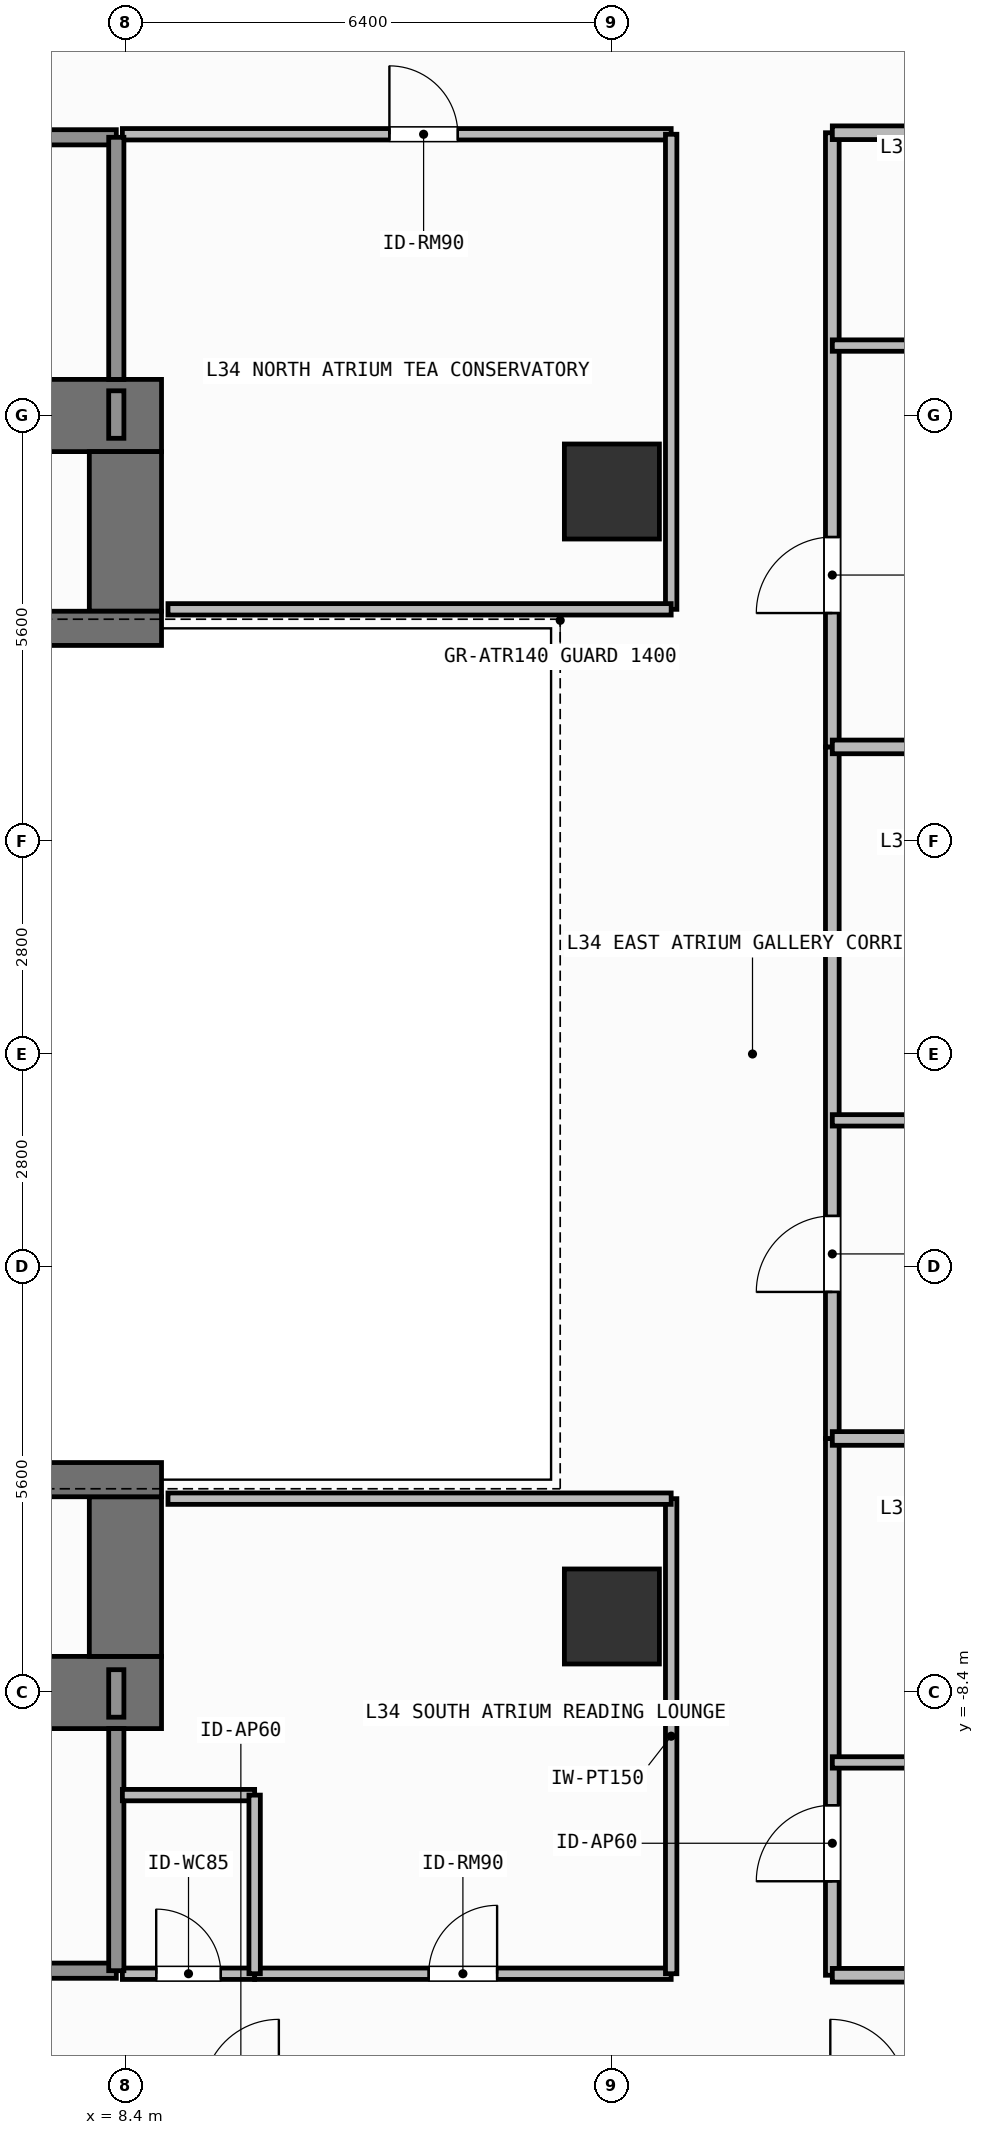
"""IFC4 building model, lengths in metres.
Left out: names, types, materials, properties, quantities, classifications, styles, units other than length and angle.
Written with IfcOpenShell. Run it as: python <this file> out.ifc"""

import sys

from ifc_helpers import new_model, si_unit, direction, frame, frame_2d, origin, origin_2d, place, context, subcontext, project, spatial, rectangle, extrude, element, fill, save


model = new_model("IFC4")
c1 = context("Model", 3, precision=1e-05, world=origin(), true_north=direction((0.0, 1.0)))
c2 = subcontext(c1, "Body", "Model", "MODEL_VIEW")
j1 = project(units=[si_unit("LENGTHUNIT", "METRE"), si_unit("PLANEANGLEUNIT", "RADIAN")], contexts=[c1])
p1 = place(None, origin())
s1 = spatial("IfcSite", under=j1, at=p1, CompositionType="ELEMENT")
p2 = place(p1, origin())
s2 = spatial("IfcBuilding", under=s1, at=p2, CompositionType="ELEMENT")
p3 = place(p2, frame((0.0, 0.0, 136.8)))
s3 = spatial("IfcBuildingStorey", under=s2, at=p3, CompositionType="ELEMENT", Elevation=136.8)
p4 = place(p3, frame((6.12, -8.4, 0.0), z_axis=(0.0, 0.0, 1.0), x_axis=(1.0, 0.0, 0.0)))
e1 = element("IfcWall", 1, at=p4, inside=s3, PredefinedType="SHEAR", context=c2, shape_type="SweptSolid", body=[
    extrude(rectangle(XDim=2.755, YDim=0.95, at=frame_2d((1.377, 0.0))), origin(), (0.0, 0.0, 1.0), 3.9),
])
p5 = place(p3, frame((-7.55, 8.4, 0.0), z_axis=(0.0, 0.0, 1.0), x_axis=(1.0, 0.0, 0.0)))
e2 = element("IfcWall", 2, at=p5, inside=s3, PredefinedType="SHEAR", context=c2, shape_type="SweptSolid", body=[
    extrude(rectangle(XDim=16.425, YDim=0.95, at=frame_2d((8.212, 0.0))), origin(), (0.0, 0.0, 1.0), 3.9),
])
for number, where, z_axis, x_axis in (
    (3, (8.4, -7.925, 0.0), (0.0, 0.0, 1.0), (0.0, 1.0, 0.0)),
    (4, (8.4, 5.825, 0.0), (0.0, 0.0, 1.0), (0.0, 1.0, 0.0)),
):
    element("IfcWall", number, at=place(p3, frame(where, z_axis=z_axis, x_axis=x_axis)), inside=s3, PredefinedType="SHEAR", context=c2, shape_type="SweptSolid", body=[
        extrude(rectangle(XDim=2.1, YDim=0.95, at=frame_2d((1.05, 0.0))), origin(), (0.0, 0.0, 1.0), 3.9),
    ])
for number, where, z_axis, x_axis in (
    (5, (3.045, -5.6, 0.0), (0.0, 0.0, 1.0), (1.0, 0.0, 0.0)),
    (6, (3.045, 5.6, 0.0), (0.0, 0.0, 1.0), (1.0, 0.0, 0.0)),
):
    element("IfcWall", number, at=place(p3, frame(where, z_axis=z_axis, x_axis=x_axis)), inside=s3, PredefinedType="SHEAR", context=c2, shape_type="SweptSolid", body=[
        extrude(rectangle(XDim=5.83, YDim=0.45, at=frame_2d((2.915, 0.0))), origin(), (0.0, 0.0, 1.0), 3.9),
    ])
for number, where, z_axis, x_axis in (
    (7, (14.8, -7.4, 0.0), (0.0, 0.0, 1.0), (1.0, 0.0, 0.0)),
    (8, (14.8, 7.4, 0.0), (0.0, 0.0, 1.0), (1.0, 0.0, 0.0)),
):
    element("IfcColumn", number, at=place(p3, frame(where, z_axis=z_axis, x_axis=x_axis)), inside=s3, PredefinedType="COLUMN", context=c2, shape_type="SweptSolid", body=[
        extrude(rectangle(XDim=1.25, YDim=1.25, at=origin_2d()), origin(), (0.0, 0.0, 1.0), 3.9),
    ])
p6 = place(p3, frame((4.58, -12.06, 0.0), z_axis=(0.0, 0.0, 1.0), x_axis=(1.0, 0.0, 0.0)))
e9 = element("IfcWall", 9, at=p6, inside=s3, PredefinedType="SOLIDWALL", context=c2, shape_type="SweptSolid", body=[
    extrude(rectangle(XDim=3.7, YDim=0.2, at=frame_2d((1.85, 0.0))), origin(), (0.0, 0.0, 1.0), 3.68),
])
p7 = place(p6, frame((1.212, 0.0, 0.0)))
e10 = element("IfcOpeningElement", 10, at=p7, cuts=e9, PredefinedType="OPENING", context=c2, shape_type="SweptSolid", body=[
    extrude(rectangle(XDim=1.1, YDim=2.15, at=frame_2d((0.55, 1.075))), frame((0.0, 0.11, 0.0), z_axis=(0.0, -1.0, 0.0), x_axis=(1.0, 0.0, 0.0)), (0.0, 0.0, 1.0), 0.22),
])
p8 = place(p3, frame((4.58, 12.06, 0.0), z_axis=(0.0, 0.0, 1.0), x_axis=(1.0, 0.0, 0.0)))
e11 = element("IfcWall", 11, at=p8, inside=s3, PredefinedType="SOLIDWALL", context=c2, shape_type="SweptSolid", body=[
    extrude(rectangle(XDim=3.7, YDim=0.2, at=frame_2d((1.85, 0.0))), origin(), (0.0, 0.0, 1.0), 3.68),
])
p9 = place(p8, frame((1.212, 0.0, 0.0)))
e12 = element("IfcOpeningElement", 12, at=p9, cuts=e11, PredefinedType="OPENING", context=c2, shape_type="SweptSolid", body=[
    extrude(rectangle(XDim=1.1, YDim=2.15, at=frame_2d((0.55, 1.075))), frame((0.0, 0.11, 0.0), z_axis=(0.0, -1.0, 0.0), x_axis=(1.0, 0.0, 0.0)), (0.0, 0.0, 1.0), 0.22),
])
p10 = place(p3, frame((8.36, -12.1, 0.0), z_axis=(0.0, 0.0, 1.0), x_axis=(1.0, 0.0, 0.0)))
e13 = element("IfcWall", 13, at=p10, inside=s3, PredefinedType="PARTITIONING", context=c2, shape_type="SweptSolid", body=[
    extrude(rectangle(XDim=1.74, YDim=0.15, at=frame_2d((0.87, 0.0))), origin(), (0.0, 0.0, 1.0), 3.68),
])
p11 = place(p10, frame((0.445, 0.0, 0.0)))
e14 = element("IfcOpeningElement", 14, at=p11, cuts=e13, PredefinedType="OPENING", context=c2, shape_type="SweptSolid", body=[
    extrude(rectangle(XDim=0.85, YDim=2.1, at=frame_2d((0.425, 1.05))), frame((0.0, 0.085, 0.0), z_axis=(0.0, -1.0, 0.0), x_axis=(1.0, 0.0, 0.0)), (0.0, 0.0, 1.0), 0.17),
])
p12 = place(p3, frame((10.1, -12.1, 0.0), z_axis=(0.0, 0.0, 1.0), x_axis=(1.0, 0.0, 0.0)))
e15 = element("IfcWall", 15, at=p12, inside=s3, PredefinedType="PARTITIONING", context=c2, shape_type="SweptSolid", body=[
    extrude(rectangle(XDim=5.48, YDim=0.15, at=frame_2d((2.74, 0.0))), origin(), (0.0, 0.0, 1.0), 3.68),
])
p13 = place(p12, frame((2.29, 0.0, 0.0)))
e16 = element("IfcOpeningElement", 16, at=p13, cuts=e15, PredefinedType="OPENING", context=c2, shape_type="SweptSolid", body=[
    extrude(rectangle(XDim=0.9, YDim=2.1, at=frame_2d((0.45, 1.05))), frame((0.0, 0.085, 0.0), z_axis=(0.0, -1.0, 0.0), x_axis=(1.0, 0.0, 0.0)), (0.0, 0.0, 1.0), 0.17),
])
p14 = place(p3, frame((8.36, 12.1, 0.0), z_axis=(0.0, 0.0, 1.0), x_axis=(1.0, 0.0, 0.0)))
e17 = element("IfcWall", 17, at=p14, inside=s3, PredefinedType="PARTITIONING", context=c2, shape_type="SweptSolid", body=[
    extrude(rectangle(XDim=7.22, YDim=0.15, at=frame_2d((3.61, 0.0))), origin(), (0.0, 0.0, 1.0), 3.68),
])
p15 = place(p14, frame((3.513, 0.0, 0.0)))
e18 = element("IfcOpeningElement", 18, at=p15, cuts=e17, PredefinedType="OPENING", context=c2, shape_type="SweptSolid", body=[
    extrude(rectangle(XDim=0.9, YDim=2.1, at=frame_2d((0.45, 1.05))), frame((0.0, 0.085, 0.0), z_axis=(0.0, -1.0, 0.0), x_axis=(1.0, 0.0, 0.0)), (0.0, 0.0, 1.0), 0.17),
])
p16 = place(p3, frame((17.7, -12.12, 0.0), z_axis=(0.0, 0.0, 1.0), x_axis=(0.0, 1.0, 0.0)))
e19 = element("IfcWall", 19, at=p16, inside=s3, PredefinedType="PARTITIONING", context=c2, shape_type="SweptSolid", body=[
    extrude(rectangle(XDim=7.062, YDim=0.18, at=frame_2d((3.531, 0.0))), origin(), (0.0, 0.0, 1.0), 3.68),
])
p17 = place(p16, frame((1.237, 0.0, 0.0)))
e20 = element("IfcOpeningElement", 20, at=p17, cuts=e19, PredefinedType="OPENING", context=c2, shape_type="SweptSolid", body=[
    extrude(rectangle(XDim=1.0, YDim=2.2, at=frame_2d((0.5, 1.1))), frame((0.0, 0.1, 0.0), z_axis=(0.0, -1.0, 0.0), x_axis=(1.0, 0.0, 0.0)), (0.0, 0.0, 1.0), 0.2),
])
p18 = place(p3, frame((17.7, -9.32, 0.0), z_axis=(0.0, 0.0, 1.0), x_axis=(1.0, 0.0, 0.0)))
e21 = element("IfcWall", 21, at=p18, inside=s3, PredefinedType="PARTITIONING", context=c2, shape_type="SweptSolid", body=[
    extrude(rectangle(XDim=3.552, YDim=0.15, at=frame_2d((1.776, 0.0))), origin(), (0.0, 0.0, 1.0), 3.68),
])
p19 = place(p18, frame((2.372, 0.0, 0.0)))
e22 = element("IfcOpeningElement", 22, at=p19, cuts=e21, PredefinedType="OPENING", context=c2, shape_type="SweptSolid", body=[
    extrude(rectangle(XDim=0.85, YDim=2.1, at=frame_2d((0.425, 1.05))), frame((0.0, 0.085, 0.0), z_axis=(0.0, -1.0, 0.0), x_axis=(1.0, 0.0, 0.0)), (0.0, 0.0, 1.0), 0.17),
])
p20 = place(p3, frame((17.7, -5.058, 0.0), z_axis=(0.0, 0.0, 1.0), x_axis=(0.0, 1.0, 0.0)))
e23 = element("IfcWall", 23, at=p20, inside=s3, PredefinedType="PARTITIONING", context=c2, shape_type="SweptSolid", body=[
    extrude(rectangle(XDim=9.098, YDim=0.18, at=frame_2d((4.549, 0.0))), origin(), (0.0, 0.0, 1.0), 3.68),
])
p21 = place(p20, frame((1.928, 0.0, 0.0)))
e24 = element("IfcOpeningElement", 24, at=p21, cuts=e23, PredefinedType="OPENING", context=c2, shape_type="SweptSolid", body=[
    extrude(rectangle(XDim=1.0, YDim=2.2, at=frame_2d((0.5, 1.1))), frame((0.0, 0.1, 0.0), z_axis=(0.0, -1.0, 0.0), x_axis=(1.0, 0.0, 0.0)), (0.0, 0.0, 1.0), 0.2),
])
p22 = place(p3, frame((17.7, -0.873, 0.0), z_axis=(0.0, 0.0, 1.0), x_axis=(1.0, 0.0, 0.0)))
e25 = element("IfcWall", 25, at=p22, inside=s3, PredefinedType="PARTITIONING", context=c2, shape_type="SweptSolid", body=[
    extrude(rectangle(XDim=3.552, YDim=0.15, at=frame_2d((1.776, 0.0))), origin(), (0.0, 0.0, 1.0), 3.68),
])
p23 = place(p22, frame((1.351, 0.0, 0.0)))
e26 = element("IfcOpeningElement", 26, at=p23, cuts=e25, PredefinedType="OPENING", context=c2, shape_type="SweptSolid", body=[
    extrude(rectangle(XDim=0.85, YDim=2.1, at=frame_2d((0.425, 1.05))), frame((0.0, 0.085, 0.0), z_axis=(0.0, -1.0, 0.0), x_axis=(1.0, 0.0, 0.0)), (0.0, 0.0, 1.0), 0.17),
])
p24 = place(p3, frame((17.7, 4.04, 0.0), z_axis=(0.0, 0.0, 1.0), x_axis=(0.0, 1.0, 0.0)))
e27 = element("IfcWall", 27, at=p24, inside=s3, PredefinedType="PARTITIONING", context=c2, shape_type="SweptSolid", body=[
    extrude(rectangle(XDim=8.08, YDim=0.18, at=frame_2d((4.04, 0.0))), origin(), (0.0, 0.0, 1.0), 3.68),
])
p25 = place(p24, frame((1.761, 0.0, 0.0)))
e28 = element("IfcOpeningElement", 28, at=p25, cuts=e27, PredefinedType="OPENING", context=c2, shape_type="SweptSolid", body=[
    extrude(rectangle(XDim=1.0, YDim=2.2, at=frame_2d((0.5, 1.1))), frame((0.0, 0.1, 0.0), z_axis=(0.0, -1.0, 0.0), x_axis=(1.0, 0.0, 0.0)), (0.0, 0.0, 1.0), 0.2),
])
p26 = place(p3, frame((17.7, 9.32, 0.0), z_axis=(0.0, 0.0, 1.0), x_axis=(1.0, 0.0, 0.0)))
e29 = element("IfcWall", 29, at=p26, inside=s3, PredefinedType="PARTITIONING", context=c2, shape_type="SweptSolid", body=[
    extrude(rectangle(XDim=3.552, YDim=0.15, at=frame_2d((1.776, 0.0))), origin(), (0.0, 0.0, 1.0), 3.68),
])
p27 = place(p26, frame((2.372, 0.0, 0.0)))
e30 = element("IfcOpeningElement", 30, at=p27, cuts=e29, PredefinedType="OPENING", context=c2, shape_type="SweptSolid", body=[
    extrude(rectangle(XDim=0.85, YDim=2.1, at=frame_2d((0.425, 1.05))), frame((0.0, 0.085, 0.0), z_axis=(0.0, -1.0, 0.0), x_axis=(1.0, 0.0, 0.0)), (0.0, 0.0, 1.0), 0.17),
])
for number, where, z_axis, x_axis in (
    (31, (8.28, -12.06, 0.0), (0.0, 0.0, 1.0), (0.0, 1.0, 0.0)),
    (32, (8.28, 8.875, 0.0), (0.0, 0.0, 1.0), (0.0, 1.0, 0.0)),
):
    element("IfcWall", number, at=place(p3, frame(where, z_axis=z_axis, x_axis=x_axis)), inside=s3, PredefinedType="SOLIDWALL", context=c2, shape_type="SweptSolid", body=[
        extrude(rectangle(XDim=3.185, YDim=0.2, at=frame_2d((1.593, 0.0))), origin(), (0.0, 0.0, 1.0), 3.68),
    ])
p28 = place(p3, frame((8.28, -8.725, 0.0), z_axis=(0.0, 0.0, 1.0), x_axis=(0.0, 1.0, 0.0)))
e33 = element("IfcWall", 33, at=p28, inside=s3, PredefinedType="SOLIDWALL", context=c2, shape_type="SweptSolid", body=[
    extrude(rectangle(XDim=0.625, YDim=0.2, at=frame_2d((0.312, 0.0))), origin(), (0.0, 0.0, 1.0), 3.68),
])
p29 = place(p3, frame((8.36, -9.75, 0.0), z_axis=(0.0, 0.0, 1.0), x_axis=(1.0, 0.0, 0.0)))
e34 = element("IfcWall", 34, at=p29, inside=s3, PredefinedType="PARTITIONING", context=c2, shape_type="SweptSolid", body=[
    extrude(rectangle(XDim=1.74, YDim=0.15, at=frame_2d((0.87, 0.0))), origin(), (0.0, 0.0, 1.0), 3.68),
])
p30 = place(p3, frame((10.1, -12.1, 0.0), z_axis=(0.0, 0.0, 1.0), x_axis=(0.0, 1.0, 0.0)))
e35 = element("IfcWall", 35, at=p30, inside=s3, PredefinedType="PARTITIONING", context=c2, shape_type="SweptSolid", body=[
    extrude(rectangle(XDim=2.35, YDim=0.15, at=frame_2d((1.175, 0.0))), origin(), (0.0, 0.0, 1.0), 3.68),
])
p31 = place(p3, frame((15.58, -12.1, 0.0), z_axis=(0.0, 0.0, 1.0), x_axis=(0.0, 1.0, 0.0)))
e36 = element("IfcWall", 36, at=p31, inside=s3, PredefinedType="PARTITIONING", context=c2, shape_type="SweptSolid", body=[
    extrude(rectangle(XDim=6.25, YDim=0.15, at=frame_2d((3.125, 0.0))), origin(), (0.0, 0.0, 1.0), 3.68),
])
p32 = place(p3, frame((8.96, -5.85, 0.0), z_axis=(0.0, 0.0, 1.0), x_axis=(1.0, 0.0, 0.0)))
e37 = element("IfcWall", 37, at=p32, inside=s3, PredefinedType="PARTITIONING", context=c2, shape_type="SweptSolid", body=[
    extrude(rectangle(XDim=6.62, YDim=0.15, at=frame_2d((3.31, 0.0))), origin(), (0.0, 0.0, 1.0), 3.68),
])
p33 = place(p3, frame((8.28, 8.1, 0.0), z_axis=(0.0, 0.0, 1.0), x_axis=(0.0, 1.0, 0.0)))
e38 = element("IfcWall", 38, at=p33, inside=s3, PredefinedType="SOLIDWALL", context=c2, shape_type="SweptSolid", body=[
    extrude(rectangle(XDim=0.625, YDim=0.2, at=frame_2d((0.312, 0.0))), origin(), (0.0, 0.0, 1.0), 3.68),
])
p34 = place(p3, frame((15.58, 5.85, 0.0), z_axis=(0.0, 0.0, 1.0), x_axis=(0.0, 1.0, 0.0)))
e39 = element("IfcWall", 39, at=p34, inside=s3, PredefinedType="PARTITIONING", context=c2, shape_type="SweptSolid", body=[
    extrude(rectangle(XDim=6.25, YDim=0.15, at=frame_2d((3.125, 0.0))), origin(), (0.0, 0.0, 1.0), 3.68),
])
p35 = place(p3, frame((8.96, 5.85, 0.0), z_axis=(0.0, 0.0, 1.0), x_axis=(1.0, 0.0, 0.0)))
e40 = element("IfcWall", 40, at=p35, inside=s3, PredefinedType="PARTITIONING", context=c2, shape_type="SweptSolid", body=[
    extrude(rectangle(XDim=6.62, YDim=0.15, at=frame_2d((3.31, 0.0))), origin(), (0.0, 0.0, 1.0), 3.68),
])
for number, where, z_axis, x_axis in (
    (41, (17.7, -5.058, 0.0), (0.0, 0.0, 1.0), (1.0, 0.0, 0.0)),
    (42, (17.7, 4.04, 0.0), (0.0, 0.0, 1.0), (1.0, 0.0, 0.0)),
    (43, (17.7, -12.12, 0.0), (0.0, 0.0, 1.0), (1.0, 0.0, 0.0)),
    (44, (17.7, 12.12, 0.0), (0.0, 0.0, 1.0), (1.0, 0.0, 0.0)),
):
    element("IfcWall", number, at=place(p3, frame(where, z_axis=z_axis, x_axis=x_axis)), inside=s3, PredefinedType="PARTITIONING", context=c2, shape_type="SweptSolid", body=[
        extrude(rectangle(XDim=9.83, YDim=0.18, at=frame_2d((4.915, 0.0))), origin(), (0.0, 0.0, 1.0), 3.68),
    ])
p36 = place(p11, origin())
e45 = element("IfcDoor", 45, at=p36, inside=s3, OperationType="SINGLE_SWING_LEFT", PredefinedType="DOOR", context=c2, shape_type="SweptSolid", body=[
    extrude(rectangle(XDim=0.85, YDim=2.1, at=frame_2d((0.425, 1.05))), frame((0.0, 0.025, 0.0), z_axis=(0.0, -1.0, 0.0), x_axis=(1.0, 0.0, 0.0)), (0.0, 0.0, 1.0), 0.05),
])
fill(e14, e45)
p37 = place(p13, origin())
e46 = element("IfcDoor", 46, at=p37, inside=s3, OperationType="SINGLE_SWING_RIGHT", PredefinedType="DOOR", context=c2, shape_type="SweptSolid", body=[
    extrude(rectangle(XDim=0.9, YDim=2.1, at=frame_2d((0.45, 1.05))), frame((0.0, 0.025, 0.0), z_axis=(0.0, -1.0, 0.0), x_axis=(1.0, 0.0, 0.0)), (0.0, 0.0, 1.0), 0.05),
])
fill(e16, e46)
p38 = place(p15, origin())
e47 = element("IfcDoor", 47, at=p38, inside=s3, OperationType="SINGLE_SWING_LEFT", PredefinedType="DOOR", context=c2, shape_type="SweptSolid", body=[
    extrude(rectangle(XDim=0.9, YDim=2.1, at=frame_2d((0.45, 1.05))), frame((0.0, 0.025, 0.0), z_axis=(0.0, -1.0, 0.0), x_axis=(1.0, 0.0, 0.0)), (0.0, 0.0, 1.0), 0.05),
])
fill(e18, e47)
p39 = place(p17, origin())
e48 = element("IfcDoor", 48, at=p39, inside=s3, OperationType="SINGLE_SWING_LEFT", PredefinedType="DOOR", context=c2, shape_type="SweptSolid", body=[
    extrude(rectangle(XDim=1.0, YDim=2.2, at=frame_2d((0.5, 1.1))), frame((0.0, 0.025, 0.0), z_axis=(0.0, -1.0, 0.0), x_axis=(1.0, 0.0, 0.0)), (0.0, 0.0, 1.0), 0.05),
])
fill(e20, e48)
p40 = place(p21, origin())
e49 = element("IfcDoor", 49, at=p40, inside=s3, OperationType="SINGLE_SWING_LEFT", PredefinedType="DOOR", context=c2, shape_type="SweptSolid", body=[
    extrude(rectangle(XDim=1.0, YDim=2.2, at=frame_2d((0.5, 1.1))), frame((0.0, 0.025, 0.0), z_axis=(0.0, -1.0, 0.0), x_axis=(1.0, 0.0, 0.0)), (0.0, 0.0, 1.0), 0.05),
])
fill(e24, e49)
p41 = place(p25, origin())
e50 = element("IfcDoor", 50, at=p41, inside=s3, OperationType="SINGLE_SWING_LEFT", PredefinedType="DOOR", context=c2, shape_type="SweptSolid", body=[
    extrude(rectangle(XDim=1.0, YDim=2.2, at=frame_2d((0.5, 1.1))), frame((0.0, 0.025, 0.0), z_axis=(0.0, -1.0, 0.0), x_axis=(1.0, 0.0, 0.0)), (0.0, 0.0, 1.0), 0.05),
])
fill(e28, e50)
save(model, sys.argv[1])
